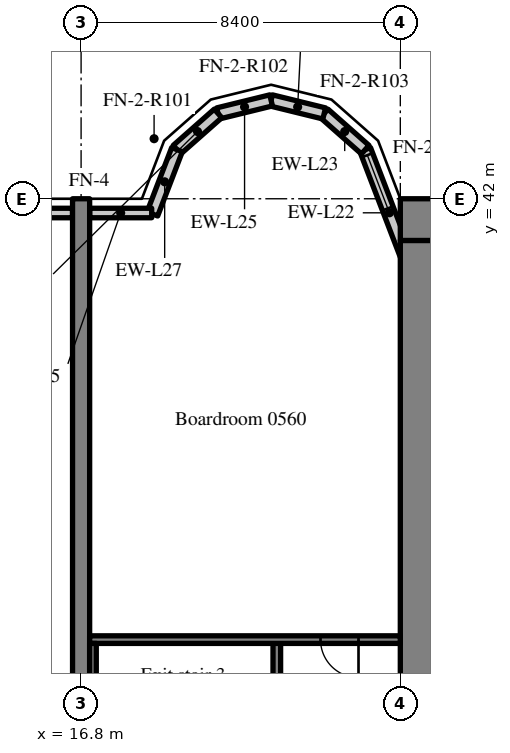
"""IFC4 building model, lengths in metres.
Left out: names, types, materials, properties, quantities, classifications, styles, units other than length and angle.
Written with IfcOpenShell. Run it as: python <this file> out.ifc"""

import sys

from ifc_helpers import new_model, si_unit, direction, frame, frame_2d, origin, place, context, subcontext, project, spatial, rectangle, extrude, source, transform, mapped, element, fill, save


model = new_model("IFC4")
c1 = context("Model", 3, precision=1e-05, world=origin(), true_north=direction((0.0, 1.0)))
c2 = subcontext(c1, "Body", "Model", "MODEL_VIEW")
j1 = project(units=[si_unit("LENGTHUNIT", "METRE"), si_unit("PLANEANGLEUNIT", "RADIAN")], contexts=[c1])
p1 = place(None, origin())
s1 = spatial("IfcSite", under=j1, at=p1, CompositionType="ELEMENT")
p2 = place(p1, origin())
s2 = spatial("IfcBuilding", under=s1, at=p2, CompositionType="ELEMENT")
p3 = place(p2, frame((0.0, 0.0, 27.8)))
s3 = spatial("IfcBuildingStorey", under=s2, at=p3, CompositionType="ELEMENT", Elevation=27.8)
m1 = source(origin(), c2, "Body", "SweptSolid", [
    extrude(rectangle(XDim=50.4, YDim=1.1, at=frame_2d((25.2, 0.0))), origin(), (0.0, 0.0, 1.0), 3.52),
])
p4 = place(p3, frame((25.2, 41.45, 0.0), z_axis=(0.0, 0.0, 1.0), x_axis=(1.0, 0.0, 0.0)))
e1 = element("IfcWall", 1, at=p4, inside=s3, PredefinedType="SHEAR", context=c2, shape_type="MappedRepresentation", body=[
    mapped(m1, transform((0.0, 0.0, 0.0), scale=1.0)),
])
m2 = source(origin(), c2, "Body", "SweptSolid", [
    extrude(rectangle(XDim=17.8, YDim=1.1, at=frame_2d((8.9, 0.0))), origin(), (0.0, 0.0, 1.0), 3.52),
])
p5 = place(p3, frame((25.75, 23.1, 0.0), z_axis=(0.0, 0.0, 1.0), x_axis=(0.0, 1.0, 0.0)))
e2 = element("IfcWall", 2, at=p5, inside=s3, PredefinedType="SHEAR", context=c2, shape_type="MappedRepresentation", body=[
    mapped(m2, transform((0.0, 0.0, 0.0), scale=1.0)),
])
m3 = source(origin(), c2, "Body", "SweptSolid", [
    extrude(rectangle(XDim=20.0, YDim=0.45, at=frame_2d((10.0, 0.0))), origin(), (0.0, 0.0, 1.0), 3.52),
])
p6 = place(p3, frame((16.8, 22.0, 0.0), z_axis=(0.0, 0.0, 1.0), x_axis=(0.0, 1.0, 0.0)))
e3 = element("IfcWall", 3, at=p6, inside=s3, PredefinedType="SHEAR", context=c2, shape_type="MappedRepresentation", body=[
    mapped(m3, transform((0.0, 0.0, 0.0), scale=1.0)),
])
m4 = source(origin(), c2, "Body", "SweptSolid", [
    extrude(rectangle(XDim=3.559, YDim=0.3, at=frame_2d((1.78, 0.0))), origin(), (0.0, 0.0, 1.0), 3.52),
])
p7 = place(p3, frame((25.55, 39.969, 0.0), z_axis=(0.0, 0.0, 1.0), x_axis=(-0.35779745313, 0.933799219604, 0.0)))
e4 = element("IfcWall", 4, at=p7, inside=s3, PredefinedType="SOLIDWALL", context=c2, shape_type="MappedRepresentation", body=[
    mapped(m4, transform((0.0, 0.0, 0.0), scale=1.0)),
])
m5 = source(origin(), c2, "Body", "SweptSolid", [
    extrude(rectangle(XDim=1.5, YDim=2.0, at=frame_2d((0.75, 1.0))), frame((0.0, 0.16, 0.0), z_axis=(0.0, -1.0, 0.0), x_axis=(1.0, 0.0, 0.0)), (0.0, 0.0, 1.0), 0.32),
])
p8 = place(p7, frame((1.903, 0.0, 0.9)))
e5 = element("IfcOpeningElement", 5, at=p8, cuts=e4, PredefinedType="OPENING", context=c2, shape_type="MappedRepresentation", body=[
    mapped(m5, transform((0.0, 0.0, 0.0), scale=1.0)),
])
m6 = source(origin(), c2, "Body", "SweptSolid", [
    extrude(rectangle(XDim=1.44, YDim=0.3, at=frame_2d((0.72, 0.0))), origin(), (0.0, 0.0, 1.0), 3.52),
])
p9 = place(p3, frame((24.277, 43.292, 0.0), z_axis=(0.0, 0.0, 1.0), x_axis=(-0.749649827867, 0.661834673902, 0.0)))
e6 = element("IfcWall", 6, at=p9, inside=s3, PredefinedType="SOLIDWALL", context=c2, shape_type="MappedRepresentation", body=[
    mapped(m6, transform((0.0, 0.0, 0.0), scale=1.0)),
])
m7 = source(origin(), c2, "Body", "SweptSolid", [
    extrude(rectangle(XDim=1.438, YDim=0.3, at=frame_2d((0.719, 0.0))), origin(), (0.0, 0.0, 1.0), 3.52),
])
p10 = place(p3, frame((23.197, 44.245, 0.0), z_axis=(0.0, 0.0, 1.0), x_axis=(-0.971152283879, 0.238460146601, 0.0)))
e7 = element("IfcWall", 7, at=p10, inside=s3, PredefinedType="SOLIDWALL", context=c2, shape_type="MappedRepresentation", body=[
    mapped(m7, transform((0.0, 0.0, 0.0), scale=1.0)),
])
m8 = source(origin(), c2, "Body", "SweptSolid", [
    extrude(rectangle(XDim=1.439, YDim=0.3, at=frame_2d((0.719, 0.0))), origin(), (0.0, 0.0, 1.0), 3.52),
])
p11 = place(p3, frame((21.8, 44.588, 0.0), z_axis=(0.0, 0.0, 1.0), x_axis=(-0.971161932466, -0.238420848351, 0.0)))
e8 = element("IfcWall", 8, at=p11, inside=s3, PredefinedType="SOLIDWALL", context=c2, shape_type="MappedRepresentation", body=[
    mapped(m8, transform((0.0, 0.0, 0.0), scale=1.0)),
])
m9 = source(origin(), c2, "Body", "SweptSolid", [
    extrude(rectangle(XDim=1.44, YDim=0.3, at=frame_2d((0.72, 0.0))), origin(), (0.0, 0.0, 1.0), 3.52),
])
p12 = place(p3, frame((20.403, 44.245, 0.0), z_axis=(0.0, 0.0, 1.0), x_axis=(-0.74957555648, -0.661918790432, 0.0)))
e9 = element("IfcWall", 9, at=p12, inside=s3, PredefinedType="SOLIDWALL", context=c2, shape_type="MappedRepresentation", body=[
    mapped(m9, transform((0.0, 0.0, 0.0), scale=1.0)),
])
m10 = source(origin(), c2, "Body", "SweptSolid", [
    extrude(rectangle(XDim=1.812, YDim=0.3, at=frame_2d((0.906, 0.0))), origin(), (0.0, 0.0, 1.0), 3.52),
])
p13 = place(p3, frame((19.323, 43.292, 0.0), z_axis=(0.0, 0.0, 1.0), x_axis=(-0.357877270961, -0.93376863244, 0.0)))
e10 = element("IfcWall", 10, at=p13, inside=s3, PredefinedType="SOLIDWALL", context=c2, shape_type="MappedRepresentation", body=[
    mapped(m10, transform((0.0, 0.0, 0.0), scale=1.0)),
])
m11 = source(origin(), c2, "Body", "SweptSolid", [
    extrude(rectangle(XDim=3.525, YDim=0.25, at=frame_2d((1.762, 0.0))), origin(), (0.0, 0.0, 1.0), 2.77),
])
p14 = place(p3, frame((16.575, 41.625, 0.0), z_axis=(0.0, 0.0, 1.0), x_axis=(-1.0, 0.0, 0.0)))
e11 = element("IfcWall", 11, at=p14, inside=s3, PredefinedType="SOLIDWALL", context=c2, shape_type="MappedRepresentation", body=[
    mapped(m11, transform((0.0, 0.0, 0.0), scale=1.0)),
])
m12 = source(origin(), c2, "Body", "SweptSolid", [
    extrude(rectangle(XDim=1.5, YDim=1.5, at=frame_2d((0.75, 0.75))), frame((0.0, 0.135, 0.0), z_axis=(0.0, -1.0, 0.0), x_axis=(1.0, 0.0, 0.0)), (0.0, 0.0, 1.0), 0.27),
])
p15 = place(p14, frame((1.012, 0.0, 0.9)))
e12 = element("IfcOpeningElement", 12, at=p15, cuts=e11, PredefinedType="OPENING", context=c2, shape_type="MappedRepresentation", body=[
    mapped(m12, transform((0.0, 0.0, 0.0), scale=1.0)),
])
m13 = source(origin(), c2, "Body", "SweptSolid", [
    extrude(rectangle(XDim=1.633, YDim=0.25, at=frame_2d((0.816, 0.0))), origin(), (0.0, 0.0, 1.0), 2.77),
])
p16 = place(p3, frame((18.658, 41.625, 0.0), z_axis=(0.0, 0.0, 1.0), x_axis=(-1.0, 0.0, 0.0)))
e13 = element("IfcWall", 13, at=p16, inside=s3, PredefinedType="SOLIDWALL", context=c2, shape_type="MappedRepresentation", body=[
    mapped(m13, transform((0.0, 0.0, 0.0), scale=1.0)),
])
m14 = source(origin(), c2, "Body", "SweptSolid", [
    extrude(rectangle(XDim=8.3, YDim=0.2, at=frame_2d((4.15, 0.0))), origin(), (0.0, 0.0, 1.0), 3.52),
])
p17 = place(p3, frame((21.95, 22.1, 0.0), z_axis=(0.0, 0.0, 1.0), x_axis=(0.0, 1.0, 0.0)))
e14 = element("IfcWall", 14, at=p17, inside=s3, PredefinedType="SOLIDWALL", context=c2, shape_type="MappedRepresentation", body=[
    mapped(m14, transform((0.0, 0.0, 0.0), scale=1.0)),
])
m15 = source(origin(), c2, "Body", "SweptSolid", [
    extrude(rectangle(XDim=1.2, YDim=2.1, at=frame_2d((0.6, 1.05))), frame((0.0, 0.11, 0.0), z_axis=(0.0, -1.0, 0.0), x_axis=(1.0, 0.0, 0.0)), (0.0, 0.0, 1.0), 0.22),
])
p18 = place(p17, frame((0.6, 0.0, 0.0)))
e15 = element("IfcOpeningElement", 15, at=p18, cuts=e14, PredefinedType="OPENING", context=c2, shape_type="MappedRepresentation", body=[
    mapped(m15, transform((0.0, 0.0, 0.0), scale=1.0)),
])
m16 = source(origin(), c2, "Body", "SweptSolid", [
    extrude(rectangle(XDim=8.175, YDim=0.2, at=frame_2d((4.087, 0.0))), origin(), (0.0, 0.0, 1.0), 3.52),
])
p19 = place(p3, frame((17.025, 30.4, 0.0), z_axis=(0.0, 0.0, 1.0), x_axis=(1.0, 0.0, 0.0)))
e16 = element("IfcWall", 16, at=p19, inside=s3, PredefinedType="SOLIDWALL", context=c2, shape_type="MappedRepresentation", body=[
    mapped(m16, transform((0.0, 0.0, 0.0), scale=1.0)),
])
m17 = source(origin(), c2, "Body", "SweptSolid", [
    extrude(rectangle(XDim=1.0, YDim=2.1, at=frame_2d((0.5, 1.05))), frame((0.0, 0.11, 0.0), z_axis=(0.0, -1.0, 0.0), x_axis=(1.0, 0.0, 0.0)), (0.0, 0.0, 1.0), 0.22),
])
p20 = place(p19, frame((6.075, 0.0, 0.0)))
e17 = element("IfcOpeningElement", 17, at=p20, cuts=e16, PredefinedType="OPENING", context=c2, shape_type="MappedRepresentation", body=[
    mapped(m17, transform((0.0, 0.0, 0.0), scale=1.0)),
])
m18 = source(origin(), c2, "Body", "SweptSolid", [
    extrude(rectangle(XDim=8.1, YDim=0.175, at=frame_2d((4.05, 0.0))), origin(), (0.0, 0.0, 1.0), 3.52),
])
p21 = place(p3, frame((17.112, 22.2, 0.0), z_axis=(0.0, 0.0, 1.0), x_axis=(0.0, 1.0, 0.0)))
e18 = element("IfcWall", 18, at=p21, inside=s3, PredefinedType="SOLIDWALL", context=c2, shape_type="MappedRepresentation", body=[
    mapped(m18, transform((0.0, 0.0, 0.0), scale=1.0)),
])
m19 = source(origin(), c2, "Body", "SweptSolid", [
    extrude(rectangle(XDim=1.5, YDim=2.0, at=frame_2d((0.75, 1.0))), frame((0.0, 0.03, 0.0), z_axis=(0.0, -1.0, 0.0), x_axis=(1.0, 0.0, 0.0)), (0.0, 0.0, 1.0), 0.06),
])
p22 = place(p8, origin())
e19 = element("IfcWindow", 19, at=p22, inside=s3, PartitioningType="SINGLE_PANEL", PredefinedType="WINDOW", context=c2, shape_type="MappedRepresentation", body=[
    mapped(m19, transform((0.0, 0.0, 0.0), scale=1.0)),
])
fill(e5, e19)
m20 = source(origin(), c2, "Body", "SweptSolid", [
    extrude(rectangle(XDim=1.0, YDim=2.1, at=frame_2d((0.5, 1.05))), frame((0.0, 0.025, 0.0), z_axis=(0.0, -1.0, 0.0), x_axis=(1.0, 0.0, 0.0)), (0.0, 0.0, 1.0), 0.05),
])
p23 = place(p20, origin())
e20 = element("IfcDoor", 20, at=p23, inside=s3, OperationType="SINGLE_SWING_RIGHT", PredefinedType="DOOR", context=c2, shape_type="MappedRepresentation", body=[
    mapped(m20, transform((0.0, 0.0, 0.0), scale=1.0)),
])
fill(e17, e20)
save(model, sys.argv[1])
